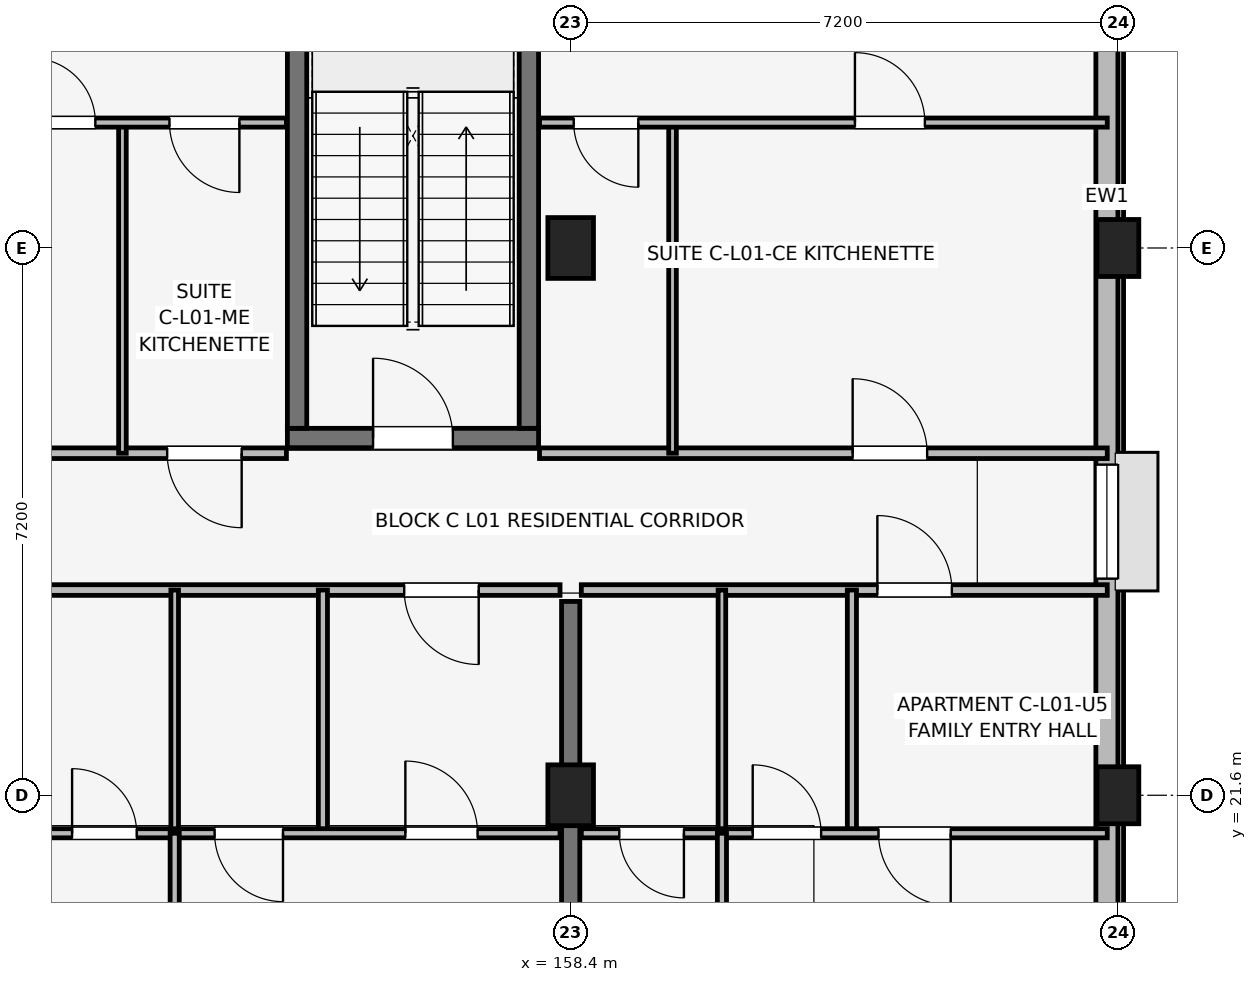
"""IFC4 building model, lengths in metres.
Left out: names, types, materials, properties, quantities, classifications, styles, units other than length and angle.
Written with IfcOpenShell. Run it as: python <this file> out.ifc"""

import sys

from ifc_helpers import new_model, si_unit, direction, frame, frame_2d, origin, origin_2d, place, context, subcontext, project, spatial, rectangle, extrude, element, fill, save


model = new_model("IFC4")
c1 = context("Model", 3, precision=1e-05, world=origin(), true_north=direction((0.0, 1.0)))
c2 = subcontext(c1, "Body", "Model", "MODEL_VIEW")
j1 = project(units=[si_unit("LENGTHUNIT", "METRE"), si_unit("PLANEANGLEUNIT", "RADIAN")], contexts=[c1])
p1 = place(None, origin())
s1 = spatial("IfcSite", under=j1, at=p1, CompositionType="ELEMENT")
p2 = place(p1, origin())
s2 = spatial("IfcBuilding", under=s1, at=p2, CompositionType="ELEMENT")
p3 = place(p2, frame((0.0, 0.0, 4.5)))
s3 = spatial("IfcBuildingStorey", under=s2, at=p3, CompositionType="ELEMENT", Elevation=4.5)
for number, where, z_axis, x_axis in (
    (1, (158.4, 21.6, 0.0), (0.0, 0.0, 1.0), (1.0, 0.0, 0.0)),
    (2, (158.4, 28.8, 0.0), (0.0, 0.0, 1.0), (1.0, 0.0, 0.0)),
):
    element("IfcColumn", number, at=place(p3, frame(where, z_axis=z_axis, x_axis=x_axis)), inside=s3, PredefinedType="COLUMN", context=c2, shape_type="SweptSolid", body=[
        extrude(rectangle(XDim=0.6, YDim=0.8, at=origin_2d()), origin(), (0.0, 0.0, 1.0), 4.2),
    ])
for number, where, z_axis, x_axis in (
    (3, (165.6, 21.6, 0.0), (0.0, 0.0, 1.0), (1.0, 0.0, 0.0)),
    (4, (165.6, 28.8, 0.0), (0.0, 0.0, 1.0), (1.0, 0.0, 0.0)),
):
    element("IfcColumn", number, at=place(p3, frame(where, z_axis=z_axis, x_axis=x_axis)), inside=s3, PredefinedType="COLUMN", context=c2, shape_type="SweptSolid", body=[
        extrude(rectangle(XDim=0.55, YDim=0.75, at=origin_2d()), origin(), (0.0, 0.0, 1.0), 4.2),
    ])
p4 = place(p3, frame((154.673, 26.3, 0.0), z_axis=(0.0, 0.0, 1.0), x_axis=(1.0, 0.0, 0.0)))
e5 = element("IfcWall", 5, at=p4, inside=s3, PredefinedType="SHEAR", context=c2, shape_type="SweptSolid", body=[
    extrude(rectangle(XDim=3.305, YDim=0.255, at=frame_2d((1.652, 0.0))), origin(), (0.0, 0.0, 1.0), 4.2),
])
p5 = place(p4, frame((1.127, 0.0, 0.0)))
e6 = element("IfcOpeningElement", 6, at=p5, cuts=e5, PredefinedType="OPENING", context=c2, shape_type="SweptSolid", body=[
    extrude(rectangle(XDim=1.05, YDim=2.12, at=frame_2d((0.525, 1.06))), frame((0.0, 0.137, 0.0), z_axis=(0.0, -1.0, 0.0), x_axis=(1.0, 0.0, 0.0)), (0.0, 0.0, 1.0), 0.275),
])
for number, where, z_axis, x_axis in (
    (7, (154.8, 26.427, 0.0), (0.0, 0.0, 1.0), (0.0, 1.0, 0.0)),
    (8, (157.85, 26.427, 0.0), (0.0, 0.0, 1.0), (0.0, 1.0, 0.0)),
):
    element("IfcWall", number, at=place(p3, frame(where, z_axis=z_axis, x_axis=x_axis)), inside=s3, PredefinedType="SHEAR", context=c2, shape_type="SweptSolid", body=[
        extrude(rectangle(XDim=6.295, YDim=0.255, at=frame_2d((3.147, 0.0))), origin(), (0.0, 0.0, 1.0), 4.2),
    ])
p6 = place(p3, frame((158.4, 14.75, 0.0), z_axis=(0.0, 0.0, 1.0), x_axis=(0.0, 1.0, 0.0)))
e9 = element("IfcWall", 9, at=p6, inside=s3, PredefinedType="SHEAR", context=c2, shape_type="SweptSolid", body=[
    extrude(rectangle(XDim=9.4, YDim=0.24, at=frame_2d((4.7, 0.0))), origin(), (0.0, 0.0, 1.0), 4.2),
])
p7 = place(p3, frame((165.455, 17.4, 0.0), z_axis=(0.0, 0.0, 1.0), x_axis=(0.0, 1.0, 0.0)))
e10 = element("IfcWall", 10, at=p7, inside=s3, PredefinedType="SOLIDWALL", context=c2, shape_type="SweptSolid", body=[
    extrude(rectangle(XDim=15.6, YDim=0.29, at=frame_2d((7.8, 0.0))), origin(), (0.0, 0.0, 1.0), 3.43),
])
p8 = place(p7, frame((7.05, 0.0, 1.05)))
e11 = element("IfcOpeningElement", 11, at=p8, cuts=e10, PredefinedType="OPENING", context=c2, shape_type="SweptSolid", body=[
    extrude(rectangle(XDim=1.5, YDim=1.15, at=frame_2d((0.75, 0.575))), frame((0.0, 0.155, 0.0), z_axis=(0.0, -1.0, 0.0), x_axis=(1.0, 0.0, 0.0)), (0.0, 0.0, 1.0), 0.31),
])
p9 = place(p7, frame((1.255, 0.0, 0.75)))
e12 = element("IfcOpeningElement", 12, at=p9, cuts=e10, PredefinedType="OPENING", context=c2, shape_type="SweptSolid", body=[
    extrude(rectangle(XDim=1.42, YDim=1.6, at=frame_2d((0.71, 0.8))), frame((0.0, 0.155, 0.0), z_axis=(0.0, -1.0, 0.0), x_axis=(1.0, 0.0, 0.0)), (0.0, 0.0, 1.0), 0.31),
])
p10 = place(p3, frame((151.34, 24.3, 0.0), z_axis=(0.0, 0.0, 1.0), x_axis=(1.0, 0.0, 0.0)))
e13 = element("IfcWall", 13, at=p10, inside=s3, PredefinedType="PARTITIONING", context=c2, shape_type="SweptSolid", body=[
    extrude(rectangle(XDim=6.92, YDim=0.14, at=frame_2d((3.46, 0.0))), origin(), (0.0, 0.0, 1.0), 3.25),
])
p11 = place(p10, frame((5.85, 0.0, 0.0), z_axis=(0.0, 0.0, 1.0), x_axis=(-1.0, 0.0, 0.0)))
e14 = element("IfcOpeningElement", 14, at=p11, cuts=e13, PredefinedType="OPENING", context=c2, shape_type="SweptSolid", body=[
    extrude(rectangle(XDim=0.98, YDim=2.1, at=frame_2d((0.49, 1.05))), frame((0.0, 0.08, 0.0), z_axis=(0.0, -1.0, 0.0), x_axis=(1.0, 0.0, 0.0)), (0.0, 0.0, 1.0), 0.16),
])
p12 = place(p3, frame((153.19, 21.1, 0.0), z_axis=(0.0, 0.0, 1.0), x_axis=(0.0, 1.0, 0.0)))
e15 = element("IfcWall", 15, at=p12, inside=s3, PredefinedType="PARTITIONING", context=c2, shape_type="SweptSolid", body=[
    extrude(rectangle(XDim=3.2, YDim=0.1, at=frame_2d((1.6, 0.0))), origin(), (0.0, 0.0, 1.0), 3.25),
])
p13 = place(p3, frame((155.14, 21.1, 0.0), z_axis=(0.0, 0.0, 1.0), x_axis=(0.0, 1.0, 0.0)))
e16 = element("IfcWall", 16, at=p13, inside=s3, PredefinedType="PARTITIONING", context=c2, shape_type="SweptSolid", body=[
    extrude(rectangle(XDim=3.2, YDim=0.12, at=frame_2d((1.6, 0.0))), origin(), (0.0, 0.0, 1.0), 3.25),
])
p14 = place(p3, frame((151.34, 21.1, 0.0), z_axis=(0.0, 0.0, 1.0), x_axis=(1.0, 0.0, 0.0)))
e17 = element("IfcWall", 17, at=p14, inside=s3, PredefinedType="PARTITIONING", context=c2, shape_type="SweptSolid", body=[
    extrude(rectangle(XDim=6.92, YDim=0.12, at=frame_2d((3.46, 0.0))), origin(), (0.0, 0.0, 1.0), 3.25),
])
p15 = place(p14, frame((0.5, 0.0, 0.0)))
e18 = element("IfcOpeningElement", 18, at=p15, cuts=e17, PredefinedType="OPENING", context=c2, shape_type="SweptSolid", body=[
    extrude(rectangle(XDim=0.85, YDim=2.08, at=frame_2d((0.425, 1.04))), frame((0.0, 0.07, 0.0), z_axis=(0.0, -1.0, 0.0), x_axis=(1.0, 0.0, 0.0)), (0.0, 0.0, 1.0), 0.14),
])
p16 = place(p14, frame((3.275, 0.0, 0.0), z_axis=(0.0, 0.0, 1.0), x_axis=(-1.0, 0.0, 0.0)))
e19 = element("IfcOpeningElement", 19, at=p16, cuts=e17, PredefinedType="OPENING", context=c2, shape_type="SweptSolid", body=[
    extrude(rectangle(XDim=0.9, YDim=2.08, at=frame_2d((0.45, 1.04))), frame((0.0, 0.07, 0.0), z_axis=(0.0, -1.0, 0.0), x_axis=(1.0, 0.0, 0.0)), (0.0, 0.0, 1.0), 0.14),
])
p17 = place(p14, frame((4.885, 0.0, 0.0)))
e20 = element("IfcOpeningElement", 20, at=p17, cuts=e17, PredefinedType="OPENING", context=c2, shape_type="SweptSolid", body=[
    extrude(rectangle(XDim=0.95, YDim=2.08, at=frame_2d((0.475, 1.04))), frame((0.0, 0.07, 0.0), z_axis=(0.0, -1.0, 0.0), x_axis=(1.0, 0.0, 0.0)), (0.0, 0.0, 1.0), 0.14),
])
p18 = place(p3, frame((153.19, 14.7, 0.0), z_axis=(0.0, 0.0, 1.0), x_axis=(0.0, 1.0, 0.0)))
e21 = element("IfcWall", 21, at=p18, inside=s3, PredefinedType="PARTITIONING", context=c2, shape_type="SweptSolid", body=[
    extrude(rectangle(XDim=6.4, YDim=0.12, at=frame_2d((3.2, 0.0))), origin(), (0.0, 0.0, 1.0), 3.25),
])
p19 = place(p18, frame((3.65, 0.0, 0.0), z_axis=(0.0, 0.0, 1.0), x_axis=(-1.0, 0.0, 0.0)))
e22 = element("IfcOpeningElement", 22, at=p19, cuts=e21, PredefinedType="OPENING", context=c2, shape_type="SweptSolid", body=[
    extrude(rectangle(XDim=0.9, YDim=2.08, at=frame_2d((0.45, 1.04))), frame((0.0, 0.07, 0.0), z_axis=(0.0, -1.0, 0.0), x_axis=(1.0, 0.0, 0.0)), (0.0, 0.0, 1.0), 0.14),
])
p20 = place(p3, frame((158.54, 24.3, 0.0), z_axis=(0.0, 0.0, 1.0), x_axis=(1.0, 0.0, 0.0)))
e23 = element("IfcWall", 23, at=p20, inside=s3, PredefinedType="PARTITIONING", context=c2, shape_type="SweptSolid", body=[
    extrude(rectangle(XDim=6.92, YDim=0.14, at=frame_2d((3.46, 0.0))), origin(), (0.0, 0.0, 1.0), 3.25),
])
p21 = place(p20, frame((3.895, 0.0, 0.0)))
e24 = element("IfcOpeningElement", 24, at=p21, cuts=e23, PredefinedType="OPENING", context=c2, shape_type="SweptSolid", body=[
    extrude(rectangle(XDim=0.98, YDim=2.1, at=frame_2d((0.49, 1.05))), frame((0.0, 0.08, 0.0), z_axis=(0.0, -1.0, 0.0), x_axis=(1.0, 0.0, 0.0)), (0.0, 0.0, 1.0), 0.16),
])
p22 = place(p3, frame((160.39, 21.1, 0.0), z_axis=(0.0, 0.0, 1.0), x_axis=(0.0, 1.0, 0.0)))
e25 = element("IfcWall", 25, at=p22, inside=s3, PredefinedType="PARTITIONING", context=c2, shape_type="SweptSolid", body=[
    extrude(rectangle(XDim=3.2, YDim=0.1, at=frame_2d((1.6, 0.0))), origin(), (0.0, 0.0, 1.0), 3.25),
])
p23 = place(p3, frame((162.1, 21.1, 0.0), z_axis=(0.0, 0.0, 1.0), x_axis=(0.0, 1.0, 0.0)))
e26 = element("IfcWall", 26, at=p23, inside=s3, PredefinedType="PARTITIONING", context=c2, shape_type="SweptSolid", body=[
    extrude(rectangle(XDim=3.2, YDim=0.12, at=frame_2d((1.6, 0.0))), origin(), (0.0, 0.0, 1.0), 3.25),
])
p24 = place(p3, frame((158.54, 21.1, 0.0), z_axis=(0.0, 0.0, 1.0), x_axis=(1.0, 0.0, 0.0)))
e27 = element("IfcWall", 27, at=p24, inside=s3, PredefinedType="PARTITIONING", context=c2, shape_type="SweptSolid", body=[
    extrude(rectangle(XDim=6.92, YDim=0.12, at=frame_2d((3.46, 0.0))), origin(), (0.0, 0.0, 1.0), 3.25),
])
p25 = place(p24, frame((1.35, 0.0, 0.0), z_axis=(0.0, 0.0, 1.0), x_axis=(-1.0, 0.0, 0.0)))
e28 = element("IfcOpeningElement", 28, at=p25, cuts=e27, PredefinedType="OPENING", context=c2, shape_type="SweptSolid", body=[
    extrude(rectangle(XDim=0.85, YDim=2.08, at=frame_2d((0.425, 1.04))), frame((0.0, 0.07, 0.0), z_axis=(0.0, -1.0, 0.0), x_axis=(1.0, 0.0, 0.0)), (0.0, 0.0, 1.0), 0.14),
])
p26 = place(p24, frame((2.255, 0.0, 0.0)))
e29 = element("IfcOpeningElement", 29, at=p26, cuts=e27, PredefinedType="OPENING", context=c2, shape_type="SweptSolid", body=[
    extrude(rectangle(XDim=0.9, YDim=2.08, at=frame_2d((0.45, 1.04))), frame((0.0, 0.07, 0.0), z_axis=(0.0, -1.0, 0.0), x_axis=(1.0, 0.0, 0.0)), (0.0, 0.0, 1.0), 0.14),
])
p27 = place(p24, frame((4.86, 0.0, 0.0), z_axis=(0.0, 0.0, 1.0), x_axis=(-1.0, 0.0, 0.0)))
e30 = element("IfcOpeningElement", 30, at=p27, cuts=e27, PredefinedType="OPENING", context=c2, shape_type="SweptSolid", body=[
    extrude(rectangle(XDim=0.95, YDim=2.08, at=frame_2d((0.475, 1.04))), frame((0.0, 0.07, 0.0), z_axis=(0.0, -1.0, 0.0), x_axis=(1.0, 0.0, 0.0)), (0.0, 0.0, 1.0), 0.14),
])
p28 = place(p3, frame((160.39, 14.7, 0.0), z_axis=(0.0, 0.0, 1.0), x_axis=(0.0, 1.0, 0.0)))
e31 = element("IfcWall", 31, at=p28, inside=s3, PredefinedType="PARTITIONING", context=c2, shape_type="SweptSolid", body=[
    extrude(rectangle(XDim=6.4, YDim=0.12, at=frame_2d((3.2, 0.0))), origin(), (0.0, 0.0, 1.0), 3.25),
])
p29 = place(p28, frame((2.75, 0.0, 0.0)))
e32 = element("IfcOpeningElement", 32, at=p29, cuts=e31, PredefinedType="OPENING", context=c2, shape_type="SweptSolid", body=[
    extrude(rectangle(XDim=0.9, YDim=2.08, at=frame_2d((0.45, 1.04))), frame((0.0, 0.07, 0.0), z_axis=(0.0, -1.0, 0.0), x_axis=(1.0, 0.0, 0.0)), (0.0, 0.0, 1.0), 0.14),
])
p30 = place(p3, frame((150.94, 26.1, 0.0), z_axis=(0.0, 0.0, 1.0), x_axis=(1.0, 0.0, 0.0)))
e33 = element("IfcWall", 33, at=p30, inside=s3, PredefinedType="PARTITIONING", context=c2, shape_type="SweptSolid", body=[
    extrude(rectangle(XDim=3.72, YDim=0.14, at=frame_2d((1.86, 0.0))), origin(), (0.0, 0.0, 1.0), 3.25),
])
p31 = place(p30, frame((3.131, 0.0, 0.0), z_axis=(0.0, 0.0, 1.0), x_axis=(-1.0, 0.0, 0.0)))
e34 = element("IfcOpeningElement", 34, at=p31, cuts=e33, PredefinedType="OPENING", context=c2, shape_type="SweptSolid", body=[
    extrude(rectangle(XDim=0.98, YDim=2.1, at=frame_2d((0.49, 1.05))), frame((0.0, 0.08, 0.0), z_axis=(0.0, -1.0, 0.0), x_axis=(1.0, 0.0, 0.0)), (0.0, 0.0, 1.0), 0.16),
])
p32 = place(p3, frame((152.502, 26.1, 0.0), z_axis=(0.0, 0.0, 1.0), x_axis=(0.0, 1.0, 0.0)))
e35 = element("IfcWall", 35, at=p32, inside=s3, PredefinedType="PARTITIONING", context=c2, shape_type="SweptSolid", body=[
    extrude(rectangle(XDim=4.35, YDim=0.1, at=frame_2d((2.175, 0.0))), origin(), (0.0, 0.0, 1.0), 3.25),
])
p33 = place(p3, frame((150.94, 30.45, 0.0), z_axis=(0.0, 0.0, 1.0), x_axis=(1.0, 0.0, 0.0)))
e36 = element("IfcWall", 36, at=p33, inside=s3, PredefinedType="PARTITIONING", context=c2, shape_type="SweptSolid", body=[
    extrude(rectangle(XDim=3.72, YDim=0.12, at=frame_2d((1.86, 0.0))), origin(), (0.0, 0.0, 1.0), 3.25),
])
p34 = place(p33, frame((0.356, 0.0, 0.0)))
e37 = element("IfcOpeningElement", 37, at=p34, cuts=e36, PredefinedType="OPENING", context=c2, shape_type="SweptSolid", body=[
    extrude(rectangle(XDim=0.85, YDim=2.08, at=frame_2d((0.425, 1.04))), frame((0.0, 0.07, 0.0), z_axis=(0.0, -1.0, 0.0), x_axis=(1.0, 0.0, 0.0)), (0.0, 0.0, 1.0), 0.14),
])
p35 = place(p33, frame((3.101, 0.0, 0.0), z_axis=(0.0, 0.0, 1.0), x_axis=(-1.0, 0.0, 0.0)))
e38 = element("IfcOpeningElement", 38, at=p35, cuts=e36, PredefinedType="OPENING", context=c2, shape_type="SweptSolid", body=[
    extrude(rectangle(XDim=0.92, YDim=2.08, at=frame_2d((0.46, 1.04))), frame((0.0, 0.07, 0.0), z_axis=(0.0, -1.0, 0.0), x_axis=(1.0, 0.0, 0.0)), (0.0, 0.0, 1.0), 0.14),
])
p36 = place(p3, frame((157.99, 26.1, 0.0), z_axis=(0.0, 0.0, 1.0), x_axis=(1.0, 0.0, 0.0)))
e39 = element("IfcWall", 39, at=p36, inside=s3, PredefinedType="PARTITIONING", context=c2, shape_type="SweptSolid", body=[
    extrude(rectangle(XDim=7.47, YDim=0.14, at=frame_2d((3.735, 0.0))), origin(), (0.0, 0.0, 1.0), 3.25),
])
p37 = place(p36, frame((4.12, 0.0, 0.0)))
e40 = element("IfcOpeningElement", 40, at=p37, cuts=e39, PredefinedType="OPENING", context=c2, shape_type="SweptSolid", body=[
    extrude(rectangle(XDim=0.98, YDim=2.1, at=frame_2d((0.49, 1.05))), frame((0.0, 0.08, 0.0), z_axis=(0.0, -1.0, 0.0), x_axis=(1.0, 0.0, 0.0)), (0.0, 0.0, 1.0), 0.16),
])
p38 = place(p3, frame((159.74, 26.1, 0.0), z_axis=(0.0, 0.0, 1.0), x_axis=(0.0, 1.0, 0.0)))
e41 = element("IfcWall", 41, at=p38, inside=s3, PredefinedType="PARTITIONING", context=c2, shape_type="SweptSolid", body=[
    extrude(rectangle(XDim=4.35, YDim=0.1, at=frame_2d((2.175, 0.0))), origin(), (0.0, 0.0, 1.0), 3.25),
])
p39 = place(p3, frame((157.99, 30.45, 0.0), z_axis=(0.0, 0.0, 1.0), x_axis=(1.0, 0.0, 0.0)))
e42 = element("IfcWall", 42, at=p39, inside=s3, PredefinedType="PARTITIONING", context=c2, shape_type="SweptSolid", body=[
    extrude(rectangle(XDim=7.47, YDim=0.12, at=frame_2d((3.735, 0.0))), origin(), (0.0, 0.0, 1.0), 3.25),
])
p40 = place(p39, frame((1.3, 0.0, 0.0), z_axis=(0.0, 0.0, 1.0), x_axis=(-1.0, 0.0, 0.0)))
e43 = element("IfcOpeningElement", 43, at=p40, cuts=e42, PredefinedType="OPENING", context=c2, shape_type="SweptSolid", body=[
    extrude(rectangle(XDim=0.85, YDim=2.08, at=frame_2d((0.425, 1.04))), frame((0.0, 0.07, 0.0), z_axis=(0.0, -1.0, 0.0), x_axis=(1.0, 0.0, 0.0)), (0.0, 0.0, 1.0), 0.14),
])
p41 = place(p39, frame((4.15, 0.0, 0.0)))
e44 = element("IfcOpeningElement", 44, at=p41, cuts=e42, PredefinedType="OPENING", context=c2, shape_type="SweptSolid", body=[
    extrude(rectangle(XDim=0.92, YDim=2.08, at=frame_2d((0.46, 1.04))), frame((0.0, 0.07, 0.0), z_axis=(0.0, -1.0, 0.0), x_axis=(1.0, 0.0, 0.0)), (0.0, 0.0, 1.0), 0.14),
])
p42 = place(p8, origin())
e45 = element("IfcWindow", 45, at=p42, inside=s3, PartitioningType="SINGLE_PANEL", PredefinedType="WINDOW", context=c2, shape_type="SweptSolid", body=[
    extrude(rectangle(XDim=1.5, YDim=1.15, at=frame_2d((0.75, 0.575))), frame((0.0, 0.03, 0.0), z_axis=(0.0, -1.0, 0.0), x_axis=(1.0, 0.0, 0.0)), (0.0, 0.0, 1.0), 0.06),
])
fill(e11, e45)
p43 = place(p11, origin())
e46 = element("IfcDoor", 46, at=p43, inside=s3, OperationType="SINGLE_SWING_RIGHT", PredefinedType="DOOR", context=c2, shape_type="SweptSolid", body=[
    extrude(rectangle(XDim=0.98, YDim=2.1, at=frame_2d((0.49, 1.05))), frame((0.0, 0.025, 0.0), z_axis=(0.0, -1.0, 0.0), x_axis=(1.0, 0.0, 0.0)), (0.0, 0.0, 1.0), 0.05),
])
fill(e14, e46)
p44 = place(p15, origin())
e47 = element("IfcDoor", 47, at=p44, inside=s3, OperationType="SINGLE_SWING_LEFT", PredefinedType="DOOR", context=c2, shape_type="SweptSolid", body=[
    extrude(rectangle(XDim=0.85, YDim=2.08, at=frame_2d((0.425, 1.04))), frame((0.0, 0.025, 0.0), z_axis=(0.0, -1.0, 0.0), x_axis=(1.0, 0.0, 0.0)), (0.0, 0.0, 1.0), 0.05),
])
fill(e18, e47)
p45 = place(p16, origin())
e48 = element("IfcDoor", 48, at=p45, inside=s3, OperationType="SINGLE_SWING_RIGHT", PredefinedType="DOOR", context=c2, shape_type="SweptSolid", body=[
    extrude(rectangle(XDim=0.9, YDim=2.08, at=frame_2d((0.45, 1.04))), frame((0.0, 0.025, 0.0), z_axis=(0.0, -1.0, 0.0), x_axis=(1.0, 0.0, 0.0)), (0.0, 0.0, 1.0), 0.05),
])
fill(e19, e48)
p46 = place(p17, origin())
e49 = element("IfcDoor", 49, at=p46, inside=s3, OperationType="SINGLE_SWING_LEFT", PredefinedType="DOOR", context=c2, shape_type="SweptSolid", body=[
    extrude(rectangle(XDim=0.95, YDim=2.08, at=frame_2d((0.475, 1.04))), frame((0.0, 0.025, 0.0), z_axis=(0.0, -1.0, 0.0), x_axis=(1.0, 0.0, 0.0)), (0.0, 0.0, 1.0), 0.05),
])
fill(e20, e49)
p47 = place(p21, origin())
e50 = element("IfcDoor", 50, at=p47, inside=s3, OperationType="SINGLE_SWING_LEFT", PredefinedType="DOOR", context=c2, shape_type="SweptSolid", body=[
    extrude(rectangle(XDim=0.98, YDim=2.1, at=frame_2d((0.49, 1.05))), frame((0.0, 0.025, 0.0), z_axis=(0.0, -1.0, 0.0), x_axis=(1.0, 0.0, 0.0)), (0.0, 0.0, 1.0), 0.05),
])
fill(e24, e50)
p48 = place(p25, origin())
e51 = element("IfcDoor", 51, at=p48, inside=s3, OperationType="SINGLE_SWING_RIGHT", PredefinedType="DOOR", context=c2, shape_type="SweptSolid", body=[
    extrude(rectangle(XDim=0.85, YDim=2.08, at=frame_2d((0.425, 1.04))), frame((0.0, 0.025, 0.0), z_axis=(0.0, -1.0, 0.0), x_axis=(1.0, 0.0, 0.0)), (0.0, 0.0, 1.0), 0.05),
])
fill(e28, e51)
p49 = place(p26, origin())
e52 = element("IfcDoor", 52, at=p49, inside=s3, OperationType="SINGLE_SWING_LEFT", PredefinedType="DOOR", context=c2, shape_type="SweptSolid", body=[
    extrude(rectangle(XDim=0.9, YDim=2.08, at=frame_2d((0.45, 1.04))), frame((0.0, 0.025, 0.0), z_axis=(0.0, -1.0, 0.0), x_axis=(1.0, 0.0, 0.0)), (0.0, 0.0, 1.0), 0.05),
])
fill(e29, e52)
p50 = place(p27, origin())
e53 = element("IfcDoor", 53, at=p50, inside=s3, OperationType="SINGLE_SWING_RIGHT", PredefinedType="DOOR", context=c2, shape_type="SweptSolid", body=[
    extrude(rectangle(XDim=0.95, YDim=2.08, at=frame_2d((0.475, 1.04))), frame((0.0, 0.025, 0.0), z_axis=(0.0, -1.0, 0.0), x_axis=(1.0, 0.0, 0.0)), (0.0, 0.0, 1.0), 0.05),
])
fill(e30, e53)
p51 = place(p31, origin())
e54 = element("IfcDoor", 54, at=p51, inside=s3, OperationType="SINGLE_SWING_RIGHT", PredefinedType="DOOR", context=c2, shape_type="SweptSolid", body=[
    extrude(rectangle(XDim=0.98, YDim=2.1, at=frame_2d((0.49, 1.05))), frame((0.0, 0.025, 0.0), z_axis=(0.0, -1.0, 0.0), x_axis=(1.0, 0.0, 0.0)), (0.0, 0.0, 1.0), 0.05),
])
fill(e34, e54)
p52 = place(p34, origin())
e55 = element("IfcDoor", 55, at=p52, inside=s3, OperationType="SINGLE_SWING_LEFT", PredefinedType="DOOR", context=c2, shape_type="SweptSolid", body=[
    extrude(rectangle(XDim=0.85, YDim=2.08, at=frame_2d((0.425, 1.04))), frame((0.0, 0.025, 0.0), z_axis=(0.0, -1.0, 0.0), x_axis=(1.0, 0.0, 0.0)), (0.0, 0.0, 1.0), 0.05),
])
fill(e37, e55)
p53 = place(p35, origin())
e56 = element("IfcDoor", 56, at=p53, inside=s3, OperationType="SINGLE_SWING_RIGHT", PredefinedType="DOOR", context=c2, shape_type="SweptSolid", body=[
    extrude(rectangle(XDim=0.92, YDim=2.08, at=frame_2d((0.46, 1.04))), frame((0.0, 0.025, 0.0), z_axis=(0.0, -1.0, 0.0), x_axis=(1.0, 0.0, 0.0)), (0.0, 0.0, 1.0), 0.05),
])
fill(e38, e56)
p54 = place(p37, origin())
e57 = element("IfcDoor", 57, at=p54, inside=s3, OperationType="SINGLE_SWING_LEFT", PredefinedType="DOOR", context=c2, shape_type="SweptSolid", body=[
    extrude(rectangle(XDim=0.98, YDim=2.1, at=frame_2d((0.49, 1.05))), frame((0.0, 0.025, 0.0), z_axis=(0.0, -1.0, 0.0), x_axis=(1.0, 0.0, 0.0)), (0.0, 0.0, 1.0), 0.05),
])
fill(e40, e57)
p55 = place(p40, origin())
e58 = element("IfcDoor", 58, at=p55, inside=s3, OperationType="SINGLE_SWING_RIGHT", PredefinedType="DOOR", context=c2, shape_type="SweptSolid", body=[
    extrude(rectangle(XDim=0.85, YDim=2.08, at=frame_2d((0.425, 1.04))), frame((0.0, 0.025, 0.0), z_axis=(0.0, -1.0, 0.0), x_axis=(1.0, 0.0, 0.0)), (0.0, 0.0, 1.0), 0.05),
])
fill(e43, e58)
p56 = place(p41, origin())
e59 = element("IfcDoor", 59, at=p56, inside=s3, OperationType="SINGLE_SWING_LEFT", PredefinedType="DOOR", context=c2, shape_type="SweptSolid", body=[
    extrude(rectangle(XDim=0.92, YDim=2.08, at=frame_2d((0.46, 1.04))), frame((0.0, 0.025, 0.0), z_axis=(0.0, -1.0, 0.0), x_axis=(1.0, 0.0, 0.0)), (0.0, 0.0, 1.0), 0.05),
])
fill(e44, e59)
p57 = place(p5, origin())
e60 = element("IfcDoor", 60, at=p57, inside=s3, OperationType="SINGLE_SWING_LEFT", PredefinedType="DOOR", context=c2, shape_type="SweptSolid", body=[
    extrude(rectangle(XDim=1.05, YDim=2.12, at=frame_2d((0.525, 1.06))), frame((0.0, 0.025, 0.0), z_axis=(0.0, -1.0, 0.0), x_axis=(1.0, 0.0, 0.0)), (0.0, 0.0, 1.0), 0.05),
])
fill(e6, e60)
save(model, sys.argv[1])
